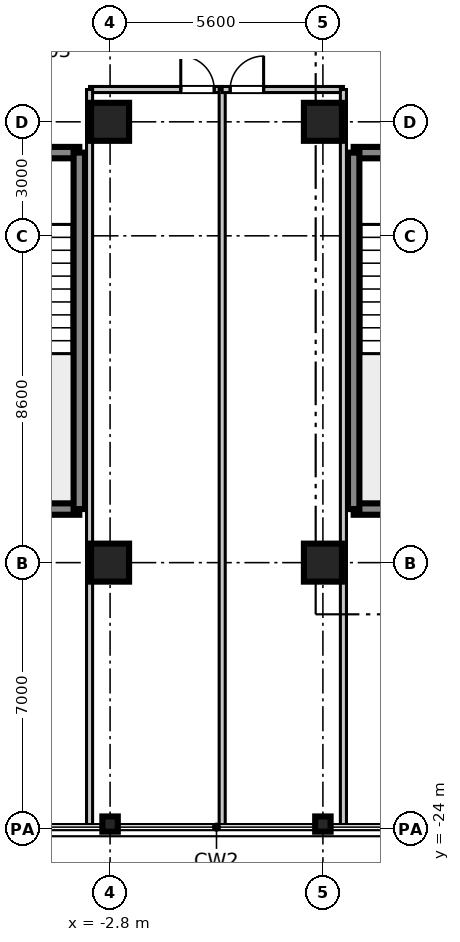
"""IFC4 building model, lengths in metres.
Left out: names, types, materials, properties, quantities, classifications, styles, units other than length and angle.
Written with IfcOpenShell. Run it as: python <this file> out.ifc"""

import sys

from ifc_helpers import new_model, si_unit, direction, frame, frame_2d, origin, origin_2d, place, context, subcontext, project, spatial, rectangle, i_section, extrude, source, transform, mapped, element, fill, save


model = new_model("IFC4")
c1 = context("Model", 3, precision=1e-05, world=origin(), true_north=direction((0.0, 1.0)))
c2 = subcontext(c1, "Body", "Model", "MODEL_VIEW")
j1 = project(units=[si_unit("LENGTHUNIT", "METRE"), si_unit("PLANEANGLEUNIT", "RADIAN")], contexts=[c1])
p1 = place(None, origin())
s1 = spatial("IfcSite", under=j1, at=p1, CompositionType="ELEMENT")
p2 = place(p1, origin())
s2 = spatial("IfcBuilding", under=s1, at=p2, CompositionType="ELEMENT")
p3 = place(p2, frame((0.0, 0.0, 241.9)))
s3 = spatial("IfcBuildingStorey", under=s2, at=p3, CompositionType="ELEMENT", Elevation=241.9)
m1 = source(origin(), c2, "Body", "SweptSolid", [
    extrude(rectangle(XDim=1.0, YDim=1.0, at=origin_2d()), origin(), (0.0, 0.0, 1.0), 3.655),
])
for number, where, z_axis, x_axis in (
    (1, (-2.8, -17.0, 0.0), (0.0, 0.0, 1.0), (1.0, 0.0, 0.0)),
    (2, (-2.8, -5.4, 0.0), (0.0, 0.0, 1.0), (1.0, 0.0, 0.0)),
    (3, (2.8, -17.0, 0.0), (0.0, 0.0, 1.0), (1.0, 0.0, 0.0)),
    (4, (2.8, -5.4, 0.0), (0.0, 0.0, 1.0), (1.0, 0.0, 0.0)),
):
    element("IfcColumn", number, at=place(p3, frame(where, z_axis=z_axis, x_axis=x_axis)), inside=s3, PredefinedType="COLUMN", context=c2, shape_type="MappedRepresentation", body=[
        mapped(m1, transform((0.0, 0.0, 0.0), scale=1.0)),
    ])
m2 = source(origin(), c2, "Body", "SweptSolid", [
    extrude(i_section(OverallWidth=0.401, OverallDepth=0.406, WebThickness=0.016, FlangeThickness=0.025, at=origin_2d()), origin(), (0.0, 0.0, 1.0), 3.655),
])
for number, where, z_axis, x_axis in (
    (5, (-2.8, -23.88, 0.0), (0.0, 0.0, 1.0), (0.0, 1.0, 0.0)),
    (6, (2.8, -23.88, 0.0), (0.0, 0.0, 1.0), (0.0, 1.0, 0.0)),
):
    element("IfcColumn", number, at=place(p3, frame(where, z_axis=z_axis, x_axis=x_axis)), inside=s3, PredefinedType="COLUMN", context=c2, shape_type="MappedRepresentation", body=[
        mapped(m2, transform((0.0, 0.0, 0.0), scale=1.0)),
    ])
m3 = source(origin(), c2, "Body", "SweptSolid", [
    extrude(rectangle(XDim=3.98, YDim=0.3, at=frame_2d((1.99, 0.0))), origin(), (0.0, 0.0, 1.0), 3.41),
])
for number, where, z_axis, x_axis in (
    (7, (3.61, -15.59, 0.0), (0.0, 0.0, 1.0), (1.0, 0.0, 0.0)),
    (8, (3.61, -6.21, 0.0), (0.0, 0.0, 1.0), (1.0, 0.0, 0.0)),
):
    element("IfcWall", number, at=place(p3, frame(where, z_axis=z_axis, x_axis=x_axis)), inside=s3, PredefinedType="SHEAR", context=c2, shape_type="MappedRepresentation", body=[
        mapped(m3, transform((0.0, 0.0, 0.0), scale=1.0)),
    ])
m4 = source(origin(), c2, "Body", "SweptSolid", [
    extrude(rectangle(XDim=9.38, YDim=0.3, at=frame_2d((4.69, 0.0))), origin(), (0.0, 0.0, 1.0), 3.41),
])
p4 = place(p3, frame((3.61, -15.59, 0.0), z_axis=(0.0, 0.0, 1.0), x_axis=(0.0, 1.0, 0.0)))
e9 = element("IfcWall", 9, at=p4, inside=s3, PredefinedType="SHEAR", context=c2, shape_type="MappedRepresentation", body=[
    mapped(m4, transform((0.0, 0.0, 0.0), scale=1.0)),
])
p5 = place(p3, frame((-7.59, -15.59, 0.0), z_axis=(0.0, 0.0, 1.0), x_axis=(1.0, 0.0, 0.0)))
e10 = element("IfcWall", 10, at=p5, inside=s3, PredefinedType="SHEAR", context=c2, shape_type="MappedRepresentation", body=[
    mapped(m3, transform((0.0, 0.0, 0.0), scale=1.0)),
])
p6 = place(p3, frame((-7.59, -6.21, 0.0), z_axis=(0.0, 0.0, 1.0), x_axis=(1.0, 0.0, 0.0)))
e11 = element("IfcWall", 11, at=p6, inside=s3, PredefinedType="SHEAR", context=c2, shape_type="MappedRepresentation", body=[
    mapped(m3, transform((0.0, 0.0, 0.0), scale=1.0)),
])
p7 = place(p6, frame((1.44, 0.0, 0.0)))
e12 = element("IfcOpeningElement", 12, at=p7, cuts=e11, PredefinedType="OPENING", context=c2, shape_type="SweptSolid", body=[
    extrude(rectangle(XDim=1.1, YDim=2.15, at=frame_2d((0.55, 1.075))), frame((0.0, 0.16, 0.0), z_axis=(0.0, -1.0, 0.0), x_axis=(1.0, 0.0, 0.0)), (0.0, 0.0, 1.0), 0.32),
])
p8 = place(p3, frame((-3.61, -15.59, 0.0), z_axis=(0.0, 0.0, 1.0), x_axis=(0.0, 1.0, 0.0)))
e13 = element("IfcWall", 13, at=p8, inside=s3, PredefinedType="SHEAR", context=c2, shape_type="MappedRepresentation", body=[
    mapped(m4, transform((0.0, 0.0, 0.0), scale=1.0)),
])
m5 = source(origin(), c2, "Body", "SweptSolid", [
    extrude(rectangle(XDim=3.49, YDim=0.16, at=frame_2d((1.745, 0.0))), origin(), (0.0, 0.0, 1.0), 2.75),
])
p9 = place(p3, frame((-3.34, -4.55, 0.0), z_axis=(0.0, 0.0, 1.0), x_axis=(1.0, 0.0, 0.0)))
e14 = element("IfcWall", 14, at=p9, inside=s3, PredefinedType="PARTITIONING", context=c2, shape_type="MappedRepresentation", body=[
    mapped(m5, transform((0.0, 0.0, 0.0), scale=1.0)),
])
p10 = place(p9, frame((2.4, 0.0, 0.0)))
e15 = element("IfcOpeningElement", 15, at=p10, cuts=e14, PredefinedType="OPENING", context=c2, shape_type="SweptSolid", body=[
    extrude(rectangle(XDim=0.88, YDim=2.1, at=frame_2d((0.44, 1.05))), frame((0.0, 0.09, 0.0), z_axis=(0.0, -1.0, 0.0), x_axis=(1.0, 0.0, 0.0)), (0.0, 0.0, 1.0), 0.18),
])
m6 = source(origin(), c2, "Body", "SweptSolid", [
    extrude(rectangle(XDim=19.35, YDim=0.16, at=frame_2d((9.675, 0.0))), origin(), (0.0, 0.0, 1.0), 2.75),
])
for number, where, z_axis, x_axis in (
    (16, (-3.34, -23.9, 0.0), (0.0, 0.0, 1.0), (0.0, 1.0, 0.0)),
    (17, (0.15, -23.9, 0.0), (0.0, 0.0, 1.0), (0.0, 1.0, 0.0)),
):
    element("IfcWall", number, at=place(p3, frame(where, z_axis=z_axis, x_axis=x_axis)), inside=s3, PredefinedType="PARTITIONING", context=c2, shape_type="MappedRepresentation", body=[
        mapped(m6, transform((0.0, 0.0, 0.0), scale=1.0)),
    ])
m7 = source(origin(), c2, "Body", "SweptSolid", [
    extrude(rectangle(XDim=3.19, YDim=0.16, at=frame_2d((1.595, 0.0))), origin(), (0.0, 0.0, 1.0), 2.75),
])
p11 = place(p3, frame((0.15, -4.55, 0.0), z_axis=(0.0, 0.0, 1.0), x_axis=(1.0, 0.0, 0.0)))
e18 = element("IfcWall", 18, at=p11, inside=s3, PredefinedType="PARTITIONING", context=c2, shape_type="MappedRepresentation", body=[
    mapped(m7, transform((0.0, 0.0, 0.0), scale=1.0)),
])
p12 = place(p11, frame((0.21, 0.0, 0.0)))
e19 = element("IfcOpeningElement", 19, at=p12, cuts=e18, PredefinedType="OPENING", context=c2, shape_type="SweptSolid", body=[
    extrude(rectangle(XDim=0.88, YDim=2.1, at=frame_2d((0.44, 1.05))), frame((0.0, 0.09, 0.0), z_axis=(0.0, -1.0, 0.0), x_axis=(1.0, 0.0, 0.0)), (0.0, 0.0, 1.0), 0.18),
])
p13 = place(p3, frame((3.34, -23.9, 0.0), z_axis=(0.0, 0.0, 1.0), x_axis=(0.0, 1.0, 0.0)))
e20 = element("IfcWall", 20, at=p13, inside=s3, PredefinedType="PARTITIONING", context=c2, shape_type="MappedRepresentation", body=[
    mapped(m6, transform((0.0, 0.0, 0.0), scale=1.0)),
])
m8 = source(origin(), c2, "Body", "SweptSolid", [
    extrude(rectangle(XDim=0.88, YDim=2.1, at=frame_2d((0.44, 1.05))), frame((0.0, 0.025, 0.0), z_axis=(0.0, -1.0, 0.0), x_axis=(1.0, 0.0, 0.0)), (0.0, 0.0, 1.0), 0.05),
])
p14 = place(p10, frame((0.88, 0.0, 0.0), z_axis=(0.0, 0.0, 1.0), x_axis=(-1.0, 0.0, 0.0)))
e21 = element("IfcDoor", 21, at=p14, inside=s3, OperationType="SINGLE_SWING_LEFT", PredefinedType="DOOR", context=c2, shape_type="MappedRepresentation", body=[
    mapped(m8, transform((0.0, 0.0, 0.0), scale=1.0)),
])
fill(e15, e21)
p15 = place(p12, frame((0.88, 0.0, 0.0), z_axis=(0.0, 0.0, 1.0), x_axis=(-1.0, 0.0, 0.0)))
e22 = element("IfcDoor", 22, at=p15, inside=s3, OperationType="SINGLE_SWING_RIGHT", PredefinedType="DOOR", context=c2, shape_type="MappedRepresentation", body=[
    mapped(m8, transform((0.0, 0.0, 0.0), scale=1.0)),
])
fill(e19, e22)
save(model, sys.argv[1])
